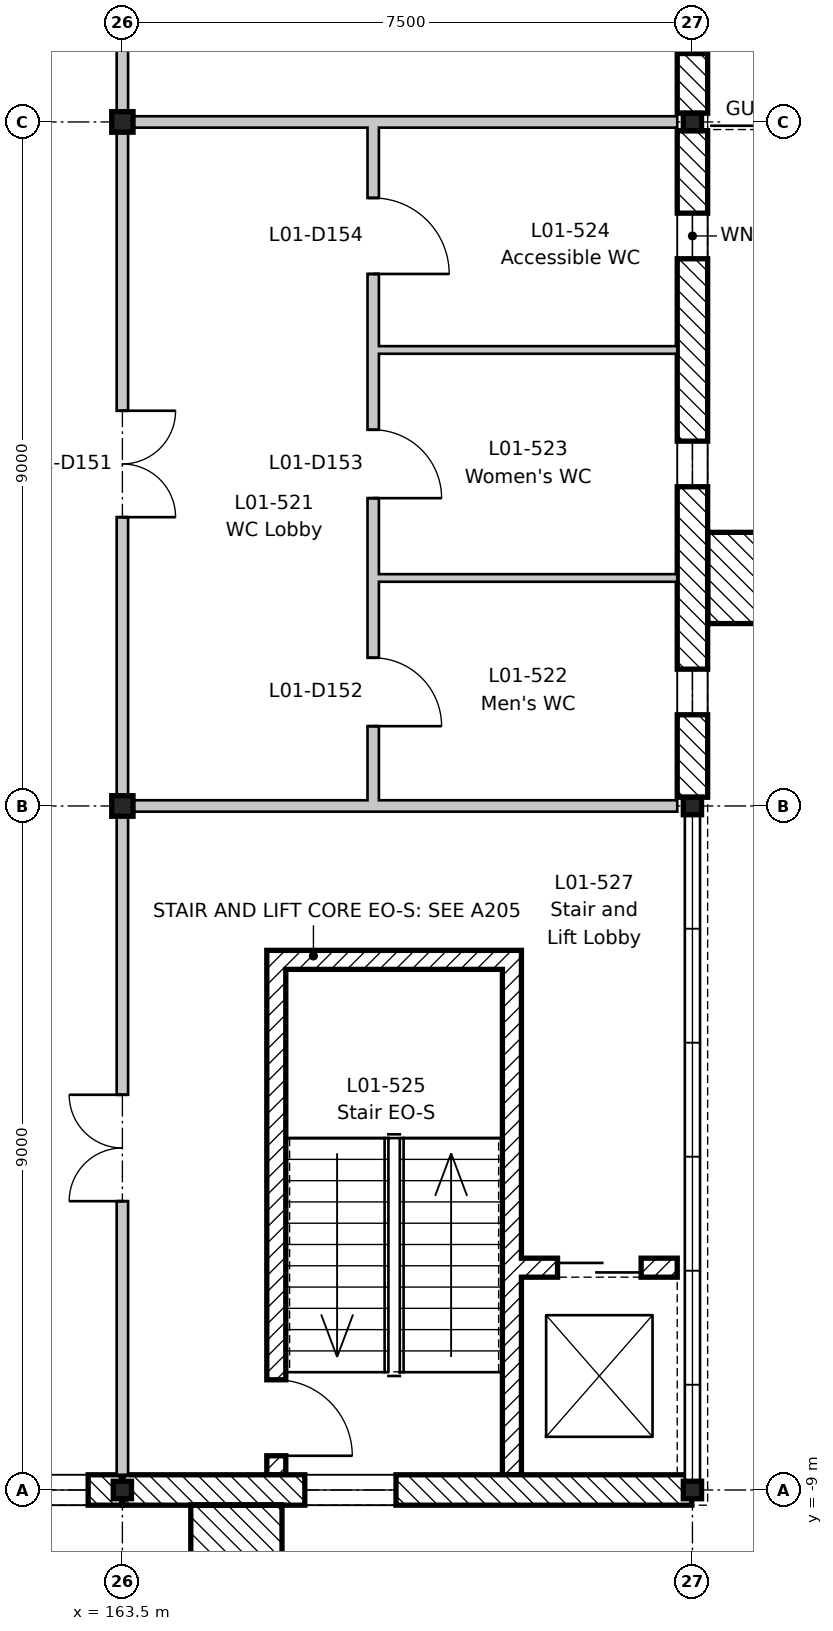
"""IFC4 building model, lengths in metres.
Left out: names, types, materials, properties, quantities, classifications, styles, units other than length and angle.
Written with IfcOpenShell. Run it as: python <this file> out.ifc"""

import sys

from ifc_helpers import new_model, si_unit, direction, frame, frame_2d, origin, origin_2d, place, context, subcontext, project, spatial, rectangle, i_section, extrude, element, fill, save


model = new_model("IFC4")
c1 = context("Model", 3, precision=1e-05, world=origin(), true_north=direction((0.0, 1.0)))
c2 = subcontext(c1, "Body", "Model", "MODEL_VIEW")
j1 = project(units=[si_unit("LENGTHUNIT", "METRE"), si_unit("PLANEANGLEUNIT", "RADIAN")], contexts=[c1])
p1 = place(None, origin())
s1 = spatial("IfcSite", under=j1, at=p1, CompositionType="ELEMENT")
p2 = place(p1, origin())
s2 = spatial("IfcBuilding", under=s1, at=p2, CompositionType="ELEMENT")
p3 = place(p2, frame((0.0, 0.0, 5.4)))
s3 = spatial("IfcBuildingStorey", under=s2, at=p3, CompositionType="ELEMENT", Elevation=5.4)
p4 = place(p3, frame((163.5, -9.0, -0.2), z_axis=(0.0, 0.0, 1.0), x_axis=(1.0, 0.0, 0.0)))
e1 = element("IfcColumn", 1, at=p4, inside=s3, PredefinedType="COLUMN", context=c2, shape_type="SweptSolid", body=[
    extrude(i_section(OverallWidth=0.24, OverallDepth=0.23, WebThickness=0.008, FlangeThickness=0.012, FilletRadius=0.021, at=origin_2d()), origin(), (0.0, 0.0, 1.0), 4.5),
])
for number, where, z_axis, x_axis in (
    (2, (163.5, 0.0, -0.2), (0.0, 0.0, 1.0), (1.0, 0.0, 0.0)),
    (3, (163.5, 9.0, -0.2), (0.0, 0.0, 1.0), (1.0, 0.0, 0.0)),
):
    element("IfcColumn", number, at=place(p3, frame(where, z_axis=z_axis, x_axis=x_axis)), inside=s3, PredefinedType="COLUMN", context=c2, shape_type="SweptSolid", body=[
        extrude(i_section(OverallWidth=0.28, OverallDepth=0.27, WebThickness=0.008, FlangeThickness=0.013, FilletRadius=0.024, at=origin_2d()), origin(), (0.0, 0.0, 1.0), 4.5),
    ])
for number, where, z_axis, x_axis in (
    (4, (171.0, -9.0, -0.2), (0.0, 0.0, 1.0), (1.0, 0.0, 0.0)),
    (5, (171.0, 0.0, -0.2), (0.0, 0.0, 1.0), (1.0, 0.0, 0.0)),
    (6, (171.0, 9.0, -0.2), (0.0, 0.0, 1.0), (1.0, 0.0, 0.0)),
):
    element("IfcColumn", number, at=place(p3, frame(where, z_axis=z_axis, x_axis=x_axis)), inside=s3, PredefinedType="COLUMN", context=c2, shape_type="SweptSolid", body=[
        extrude(i_section(OverallWidth=0.24, OverallDepth=0.23, WebThickness=0.008, FlangeThickness=0.012, FilletRadius=0.021, at=origin_2d()), origin(), (0.0, 0.0, 1.0), 4.5),
    ])
p5 = place(p3, frame((168.625, -8.8, 0.0), z_axis=(0.0, 0.0, 1.0), x_axis=(0.0, 1.0, 0.0)))
e7 = element("IfcWall", 7, at=p5, inside=s3, PredefinedType="SHEAR", context=c2, shape_type="SweptSolid", body=[
    extrude(rectangle(XDim=6.9, YDim=0.25, at=frame_2d((3.45, 0.0))), origin(), (0.0, 0.0, 1.0), 4.3),
])
p6 = place(p3, frame((165.525, -8.8, 0.0), z_axis=(0.0, 0.0, 1.0), x_axis=(0.0, 1.0, 0.0)))
e8 = element("IfcWall", 8, at=p6, inside=s3, PredefinedType="SHEAR", context=c2, shape_type="SweptSolid", body=[
    extrude(rectangle(XDim=6.9, YDim=0.25, at=frame_2d((3.45, 0.0))), origin(), (0.0, 0.0, 1.0), 4.3),
])
p7 = place(p6, frame((0.25, 0.0, 0.0)))
e9 = element("IfcOpeningElement", 9, at=p7, cuts=e8, PredefinedType="OPENING", context=c2, shape_type="SweptSolid", body=[
    extrude(rectangle(XDim=1.0, YDim=2.1, at=frame_2d((0.5, 1.05))), frame((0.0, 0.135, 0.0), z_axis=(0.0, -1.0, 0.0), x_axis=(1.0, 0.0, 0.0)), (0.0, 0.0, 1.0), 0.27),
])
p8 = place(p3, frame((165.65, -2.025, 0.0), z_axis=(0.0, 0.0, 1.0), x_axis=(1.0, 0.0, 0.0)))
e10 = element("IfcWall", 10, at=p8, inside=s3, PredefinedType="SHEAR", context=c2, shape_type="SweptSolid", body=[
    extrude(rectangle(XDim=2.85, YDim=0.25, at=frame_2d((1.425, 0.0))), origin(), (0.0, 0.0, 1.0), 4.3),
])
p9 = place(p3, frame((168.75, -6.075, 0.0), z_axis=(0.0, 0.0, 1.0), x_axis=(1.0, 0.0, 0.0)))
e11 = element("IfcWall", 11, at=p9, inside=s3, PredefinedType="SHEAR", context=c2, shape_type="SweptSolid", body=[
    extrude(rectangle(XDim=2.05, YDim=0.25, at=frame_2d((1.025, 0.0))), origin(), (0.0, 0.0, 1.0), 4.3),
])
p10 = place(p9, frame((0.475, 0.0, 0.0)))
e12 = element("IfcOpeningElement", 12, at=p10, cuts=e11, PredefinedType="OPENING", context=c2, shape_type="SweptSolid", body=[
    extrude(rectangle(XDim=1.1, YDim=2.1, at=frame_2d((0.55, 1.05))), frame((0.0, 0.135, 0.0), z_axis=(0.0, -1.0, 0.0), x_axis=(1.0, 0.0, 0.0)), (0.0, 0.0, 1.0), 0.27),
])
p11 = place(p3, frame((171.0, 8.885, 0.0), z_axis=(0.0, 0.0, 1.0), x_axis=(0.0, -1.0, 0.0)))
e13 = element("IfcWall", 13, at=p11, inside=s3, PredefinedType="STANDARD", context=c2, shape_type="SweptSolid", body=[
    extrude(rectangle(XDim=8.77, YDim=0.4, at=frame_2d((4.385, 0.0))), origin(), (0.0, 0.0, 1.0), 3.9),
])
p12 = place(p11, frame((7.085, 0.0, 1.5)))
e14 = element("IfcOpeningElement", 14, at=p12, cuts=e13, PredefinedType="OPENING", context=c2, shape_type="SweptSolid", body=[
    extrude(rectangle(XDim=0.6, YDim=1.2, at=frame_2d((0.3, 0.6))), frame((0.0, 0.21, 0.0), z_axis=(0.0, -1.0, 0.0), x_axis=(1.0, 0.0, 0.0)), (0.0, 0.0, 1.0), 0.42),
])
p13 = place(p11, frame((4.085, 0.0, 1.5)))
e15 = element("IfcOpeningElement", 15, at=p13, cuts=e13, PredefinedType="OPENING", context=c2, shape_type="SweptSolid", body=[
    extrude(rectangle(XDim=0.6, YDim=1.2, at=frame_2d((0.3, 0.6))), frame((0.0, 0.21, 0.0), z_axis=(0.0, -1.0, 0.0), x_axis=(1.0, 0.0, 0.0)), (0.0, 0.0, 1.0), 0.42),
])
p14 = place(p11, frame((1.085, 0.0, 1.5)))
e16 = element("IfcOpeningElement", 16, at=p14, cuts=e13, PredefinedType="OPENING", context=c2, shape_type="SweptSolid", body=[
    extrude(rectangle(XDim=0.6, YDim=1.2, at=frame_2d((0.3, 0.6))), frame((0.0, 0.21, 0.0), z_axis=(0.0, -1.0, 0.0), x_axis=(1.0, 0.0, 0.0)), (0.0, 0.0, 1.0), 0.42),
])
p15 = place(p3, frame((171.0, 17.885, 0.0), z_axis=(0.0, 0.0, 1.0), x_axis=(0.0, -1.0, 0.0)))
e17 = element("IfcWall", 17, at=p15, inside=s3, PredefinedType="STANDARD", context=c2, shape_type="SweptSolid", body=[
    extrude(rectangle(XDim=8.77, YDim=0.4, at=frame_2d((4.385, 0.0))), origin(), (0.0, 0.0, 1.0), 3.9),
])
p16 = place(p15, frame((6.785, 0.0, 0.9)))
e18 = element("IfcOpeningElement", 18, at=p16, cuts=e17, PredefinedType="OPENING", context=c2, shape_type="SweptSolid", body=[
    extrude(rectangle(XDim=1.2, YDim=2.4, at=frame_2d((0.6, 1.2))), frame((0.0, 0.21, 0.0), z_axis=(0.0, -1.0, 0.0), x_axis=(1.0, 0.0, 0.0)), (0.0, 0.0, 1.0), 0.42),
])
p17 = place(p15, frame((3.785, 0.0, 0.9)))
e19 = element("IfcOpeningElement", 19, at=p17, cuts=e17, PredefinedType="OPENING", context=c2, shape_type="SweptSolid", body=[
    extrude(rectangle(XDim=1.2, YDim=2.4, at=frame_2d((0.6, 1.2))), frame((0.0, 0.21, 0.0), z_axis=(0.0, -1.0, 0.0), x_axis=(1.0, 0.0, 0.0)), (0.0, 0.0, 1.0), 0.42),
])
p18 = place(p15, frame((0.785, 0.0, 0.9)))
e20 = element("IfcOpeningElement", 20, at=p18, cuts=e17, PredefinedType="OPENING", context=c2, shape_type="SweptSolid", body=[
    extrude(rectangle(XDim=1.2, YDim=2.4, at=frame_2d((0.6, 1.2))), frame((0.0, 0.21, 0.0), z_axis=(0.0, -1.0, 0.0), x_axis=(1.0, 0.0, 0.0)), (0.0, 0.0, 1.0), 0.42),
])
p19 = place(p3, frame((163.491, -9.0, 0.0), z_axis=(0.0, 0.0, 1.0), x_axis=(-1.0, 0.0, 0.0)))
e21 = element("IfcWall", 21, at=p19, inside=s3, PredefinedType="STANDARD", context=c2, shape_type="SweptSolid", body=[
    extrude(rectangle(XDim=2.982, YDim=0.4, at=frame_2d((1.491, 0.0))), origin(), (0.0, 0.0, 1.0), 4.1),
])
p20 = place(p19, frame((0.441, 0.0, 0.9)))
e22 = element("IfcOpeningElement", 22, at=p20, cuts=e21, PredefinedType="OPENING", context=c2, shape_type="SweptSolid", body=[
    extrude(rectangle(XDim=2.1, YDim=2.1, at=frame_2d((1.05, 1.05))), frame((0.0, 0.21, 0.0), z_axis=(0.0, -1.0, 0.0), x_axis=(1.0, 0.0, 0.0)), (0.0, 0.0, 1.0), 0.42),
])
p21 = place(p3, frame((170.991, -9.0, 0.0), z_axis=(0.0, 0.0, 1.0), x_axis=(-1.0, 0.0, 0.0)))
e23 = element("IfcWall", 23, at=p21, inside=s3, PredefinedType="STANDARD", context=c2, shape_type="SweptSolid", body=[
    extrude(rectangle(XDim=7.482, YDim=0.4, at=frame_2d((3.741, 0.0))), origin(), (0.0, 0.0, 1.0), 3.97),
])
p22 = place(p21, frame((3.891, 0.0, 0.9)))
e24 = element("IfcOpeningElement", 24, at=p22, cuts=e23, PredefinedType="OPENING", context=c2, shape_type="SweptSolid", body=[
    extrude(rectangle(XDim=1.2, YDim=2.7, at=frame_2d((0.6, 1.35))), frame((0.0, 0.21, 0.0), z_axis=(0.0, -1.0, 0.0), x_axis=(1.0, 0.0, 0.0)), (0.0, 0.0, 1.0), 0.42),
])
for number, where, z_axis, x_axis in (
    (25, (171.8, 2.4, 0.0), (0.0, 0.0, 1.0), (0.0, 1.0, 0.0)),
    (26, (164.4, -9.8, 0.0), (0.0, 0.0, 1.0), (1.0, 0.0, 0.0)),
):
    element("IfcWall", number, at=place(p3, frame(where, z_axis=z_axis, x_axis=x_axis)), inside=s3, PredefinedType="STANDARD", context=c2, shape_type="SweptSolid", body=[
        extrude(rectangle(XDim=1.2, YDim=1.2, at=frame_2d((0.6, 0.0))), origin(), (0.0, 0.0, 1.0), 4.5),
    ])
for number, where, z_axis, x_axis in (
    (27, (163.575, 9.0, 0.0), (0.0, 0.0, 1.0), (1.0, 0.0, 0.0)),
    (28, (163.575, 0.0, 0.0), (0.0, 0.0, 1.0), (1.0, 0.0, 0.0)),
):
    element("IfcWall", number, at=place(p3, frame(where, z_axis=z_axis, x_axis=x_axis)), inside=s3, PredefinedType="PARTITIONING", context=c2, shape_type="SweptSolid", body=[
        extrude(rectangle(XDim=7.225, YDim=0.15, at=frame_2d((3.613, 0.0))), origin(), (0.0, 0.0, 1.0), 3.95),
    ])
p23 = place(p3, frame((163.5, -8.8, 0.0), z_axis=(0.0, 0.0, 1.0), x_axis=(0.0, 1.0, 0.0)))
e29 = element("IfcWall", 29, at=p23, inside=s3, PredefinedType="PARTITIONING", context=c2, shape_type="SweptSolid", body=[
    extrude(rectangle(XDim=62.6, YDim=0.15, at=frame_2d((31.3, 0.0))), origin(), (0.0, 0.0, 1.0), 3.78),
])
p24 = place(p23, frame((18.8, 0.0, 0.0)))
e30 = element("IfcOpeningElement", 30, at=p24, cuts=e29, PredefinedType="OPENING", context=c2, shape_type="SweptSolid", body=[
    extrude(rectangle(XDim=1.0, YDim=2.1, at=frame_2d((0.5, 1.05))), frame((0.0, 0.085, 0.0), z_axis=(0.0, -1.0, 0.0), x_axis=(1.0, 0.0, 0.0)), (0.0, 0.0, 1.0), 0.17),
])
p25 = place(p23, frame((23.3, 0.0, 0.0)))
e31 = element("IfcOpeningElement", 31, at=p25, cuts=e29, PredefinedType="OPENING", context=c2, shape_type="SweptSolid", body=[
    extrude(rectangle(XDim=1.0, YDim=2.1, at=frame_2d((0.5, 1.05))), frame((0.0, 0.085, 0.0), z_axis=(0.0, -1.0, 0.0), x_axis=(1.0, 0.0, 0.0)), (0.0, 0.0, 1.0), 0.17),
])
p26 = place(p23, frame((29.3, 0.0, 0.0)))
e32 = element("IfcOpeningElement", 32, at=p26, cuts=e29, PredefinedType="OPENING", context=c2, shape_type="SweptSolid", body=[
    extrude(rectangle(XDim=1.0, YDim=2.1, at=frame_2d((0.5, 1.05))), frame((0.0, 0.085, 0.0), z_axis=(0.0, -1.0, 0.0), x_axis=(1.0, 0.0, 0.0)), (0.0, 0.0, 1.0), 0.17),
])
p27 = place(p23, frame((33.8, 0.0, 0.0)))
e33 = element("IfcOpeningElement", 33, at=p27, cuts=e29, PredefinedType="OPENING", context=c2, shape_type="SweptSolid", body=[
    extrude(rectangle(XDim=1.0, YDim=2.1, at=frame_2d((0.5, 1.05))), frame((0.0, 0.085, 0.0), z_axis=(0.0, -1.0, 0.0), x_axis=(1.0, 0.0, 0.0)), (0.0, 0.0, 1.0), 0.17),
])
p28 = place(p23, frame((45.8, 0.0, 0.0)))
e34 = element("IfcOpeningElement", 34, at=p28, cuts=e29, PredefinedType="OPENING", context=c2, shape_type="SweptSolid", body=[
    extrude(rectangle(XDim=1.0, YDim=2.1, at=frame_2d((0.5, 1.05))), frame((0.0, 0.085, 0.0), z_axis=(0.0, -1.0, 0.0), x_axis=(1.0, 0.0, 0.0)), (0.0, 0.0, 1.0), 0.17),
])
p29 = place(p23, frame((48.8, 0.0, 0.0)))
e35 = element("IfcOpeningElement", 35, at=p29, cuts=e29, PredefinedType="OPENING", context=c2, shape_type="SweptSolid", body=[
    extrude(rectangle(XDim=1.0, YDim=2.1, at=frame_2d((0.5, 1.05))), frame((0.0, 0.085, 0.0), z_axis=(0.0, -1.0, 0.0), x_axis=(1.0, 0.0, 0.0)), (0.0, 0.0, 1.0), 0.17),
])
p30 = place(p23, frame((51.8, 0.0, 0.0)))
e36 = element("IfcOpeningElement", 36, at=p30, cuts=e29, PredefinedType="OPENING", context=c2, shape_type="SweptSolid", body=[
    extrude(rectangle(XDim=1.0, YDim=2.1, at=frame_2d((0.5, 1.05))), frame((0.0, 0.085, 0.0), z_axis=(0.0, -1.0, 0.0), x_axis=(1.0, 0.0, 0.0)), (0.0, 0.0, 1.0), 0.17),
])
p31 = place(p23, frame((12.6, 0.0, 0.0)))
e37 = element("IfcOpeningElement", 37, at=p31, cuts=e29, PredefinedType="OPENING", context=c2, shape_type="SweptSolid", body=[
    extrude(rectangle(XDim=1.4, YDim=2.1, at=frame_2d((0.7, 1.05))), frame((0.0, 0.085, 0.0), z_axis=(0.0, -1.0, 0.0), x_axis=(1.0, 0.0, 0.0)), (0.0, 0.0, 1.0), 0.17),
])
p32 = place(p23, frame((3.6, 0.0, 0.0)))
e38 = element("IfcOpeningElement", 38, at=p32, cuts=e29, PredefinedType="OPENING", context=c2, shape_type="SweptSolid", body=[
    extrude(rectangle(XDim=1.4, YDim=2.1, at=frame_2d((0.7, 1.05))), frame((0.0, 0.085, 0.0), z_axis=(0.0, -1.0, 0.0), x_axis=(1.0, 0.0, 0.0)), (0.0, 0.0, 1.0), 0.17),
])
p33 = place(p23, frame((57.6, 0.0, 0.0)))
e39 = element("IfcOpeningElement", 39, at=p33, cuts=e29, PredefinedType="OPENING", context=c2, shape_type="SweptSolid", body=[
    extrude(rectangle(XDim=1.4, YDim=2.1, at=frame_2d((0.7, 1.05))), frame((0.0, 0.085, 0.0), z_axis=(0.0, -1.0, 0.0), x_axis=(1.0, 0.0, 0.0)), (0.0, 0.0, 1.0), 0.17),
])
p34 = place(p23, frame((36.75, 0.0, 0.0)))
e40 = element("IfcOpeningElement", 40, at=p34, cuts=e29, PredefinedType="OPENING", context=c2, shape_type="SweptSolid", body=[
    extrude(rectangle(XDim=1.0, YDim=2.1, at=frame_2d((0.5, 1.05))), frame((0.0, 0.085, 0.0), z_axis=(0.0, -1.0, 0.0), x_axis=(1.0, 0.0, 0.0)), (0.0, 0.0, 1.0), 0.17),
])
p35 = place(p23, frame((42.65, 0.0, 0.0)))
e41 = element("IfcOpeningElement", 41, at=p35, cuts=e29, PredefinedType="OPENING", context=c2, shape_type="SweptSolid", body=[
    extrude(rectangle(XDim=1.4, YDim=2.1, at=frame_2d((0.7, 1.05))), frame((0.0, 0.085, 0.0), z_axis=(0.0, -1.0, 0.0), x_axis=(1.0, 0.0, 0.0)), (0.0, 0.0, 1.0), 0.17),
])
p36 = place(p3, frame((166.8, 0.075, 0.0), z_axis=(0.0, 0.0, 1.0), x_axis=(0.0, 1.0, 0.0)))
e42 = element("IfcWall", 42, at=p36, inside=s3, PredefinedType="PARTITIONING", context=c2, shape_type="SweptSolid", body=[
    extrude(rectangle(XDim=8.85, YDim=0.15, at=frame_2d((4.425, 0.0))), origin(), (0.0, 0.0, 1.0), 4.3),
])
p37 = place(p36, frame((0.975, 0.0, 0.0)))
e43 = element("IfcOpeningElement", 43, at=p37, cuts=e42, PredefinedType="OPENING", context=c2, shape_type="SweptSolid", body=[
    extrude(rectangle(XDim=0.9, YDim=2.1, at=frame_2d((0.45, 1.05))), frame((0.0, 0.085, 0.0), z_axis=(0.0, -1.0, 0.0), x_axis=(1.0, 0.0, 0.0)), (0.0, 0.0, 1.0), 0.17),
])
p38 = place(p36, frame((3.975, 0.0, 0.0)))
e44 = element("IfcOpeningElement", 44, at=p38, cuts=e42, PredefinedType="OPENING", context=c2, shape_type="SweptSolid", body=[
    extrude(rectangle(XDim=0.9, YDim=2.1, at=frame_2d((0.45, 1.05))), frame((0.0, 0.085, 0.0), z_axis=(0.0, -1.0, 0.0), x_axis=(1.0, 0.0, 0.0)), (0.0, 0.0, 1.0), 0.17),
])
p39 = place(p36, frame((6.925, 0.0, 0.0)))
e45 = element("IfcOpeningElement", 45, at=p39, cuts=e42, PredefinedType="OPENING", context=c2, shape_type="SweptSolid", body=[
    extrude(rectangle(XDim=1.0, YDim=2.1, at=frame_2d((0.5, 1.05))), frame((0.0, 0.085, 0.0), z_axis=(0.0, -1.0, 0.0), x_axis=(1.0, 0.0, 0.0)), (0.0, 0.0, 1.0), 0.17),
])
for number, where, z_axis, x_axis in (
    (46, (166.875, 3.0, 0.0), (0.0, 0.0, 1.0), (1.0, 0.0, 0.0)),
    (47, (166.875, 6.0, 0.0), (0.0, 0.0, 1.0), (1.0, 0.0, 0.0)),
):
    element("IfcWall", number, at=place(p3, frame(where, z_axis=z_axis, x_axis=x_axis)), inside=s3, PredefinedType="PARTITIONING", context=c2, shape_type="SweptSolid", body=[
        extrude(rectangle(XDim=3.925, YDim=0.1, at=frame_2d((1.962, 0.0))), origin(), (0.0, 0.0, 1.0), 4.3),
    ])
p40 = place(p12, origin())
e48 = element("IfcWindow", 48, at=p40, inside=s3, PartitioningType="SINGLE_PANEL", PredefinedType="WINDOW", context=c2, shape_type="SweptSolid", body=[
    extrude(rectangle(XDim=0.6, YDim=1.2, at=frame_2d((0.3, 0.6))), frame((0.0, -0.12, 0.0), z_axis=(0.0, -1.0, 0.0), x_axis=(1.0, 0.0, 0.0)), (0.0, 0.0, 1.0), 0.06),
])
fill(e14, e48)
p41 = place(p13, origin())
e49 = element("IfcWindow", 49, at=p41, inside=s3, PartitioningType="SINGLE_PANEL", PredefinedType="WINDOW", context=c2, shape_type="SweptSolid", body=[
    extrude(rectangle(XDim=0.6, YDim=1.2, at=frame_2d((0.3, 0.6))), frame((0.0, -0.12, 0.0), z_axis=(0.0, -1.0, 0.0), x_axis=(1.0, 0.0, 0.0)), (0.0, 0.0, 1.0), 0.06),
])
fill(e15, e49)
p42 = place(p14, origin())
e50 = element("IfcWindow", 50, at=p42, inside=s3, PartitioningType="SINGLE_PANEL", PredefinedType="WINDOW", context=c2, shape_type="SweptSolid", body=[
    extrude(rectangle(XDim=0.6, YDim=1.2, at=frame_2d((0.3, 0.6))), frame((0.0, -0.12, 0.0), z_axis=(0.0, -1.0, 0.0), x_axis=(1.0, 0.0, 0.0)), (0.0, 0.0, 1.0), 0.06),
])
fill(e16, e50)
p43 = place(p16, origin())
e51 = element("IfcWindow", 51, at=p43, inside=s3, PartitioningType="SINGLE_PANEL", PredefinedType="WINDOW", context=c2, shape_type="SweptSolid", body=[
    extrude(rectangle(XDim=1.2, YDim=2.4, at=frame_2d((0.6, 1.2))), frame((0.0, -0.12, 0.0), z_axis=(0.0, -1.0, 0.0), x_axis=(1.0, 0.0, 0.0)), (0.0, 0.0, 1.0), 0.06),
])
fill(e18, e51)
p44 = place(p20, origin())
e52 = element("IfcWindow", 52, at=p44, inside=s3, PartitioningType="SINGLE_PANEL", PredefinedType="WINDOW", context=c2, shape_type="SweptSolid", body=[
    extrude(rectangle(XDim=2.1, YDim=2.1, at=frame_2d((1.05, 1.05))), frame((0.0, -0.12, 0.0), z_axis=(0.0, -1.0, 0.0), x_axis=(1.0, 0.0, 0.0)), (0.0, 0.0, 1.0), 0.06),
])
fill(e22, e52)
p45 = place(p22, origin())
e53 = element("IfcWindow", 53, at=p45, inside=s3, PartitioningType="SINGLE_PANEL", PredefinedType="WINDOW", context=c2, shape_type="SweptSolid", body=[
    extrude(rectangle(XDim=1.2, YDim=2.7, at=frame_2d((0.6, 1.35))), frame((0.0, -0.12, 0.0), z_axis=(0.0, -1.0, 0.0), x_axis=(1.0, 0.0, 0.0)), (0.0, 0.0, 1.0), 0.06),
])
fill(e24, e53)
p46 = place(p31, frame((1.4, 0.0, 0.0), z_axis=(0.0, 0.0, 1.0), x_axis=(-1.0, 0.0, 0.0)))
e54 = element("IfcDoor", 54, at=p46, inside=s3, OperationType="DOUBLE_DOOR_SINGLE_SWING", PredefinedType="DOOR", context=c2, shape_type="SweptSolid", body=[
    extrude(rectangle(XDim=1.4, YDim=2.1, at=frame_2d((0.7, 1.05))), frame((0.0, 0.025, 0.0), z_axis=(0.0, -1.0, 0.0), x_axis=(1.0, 0.0, 0.0)), (0.0, 0.0, 1.0), 0.05),
])
fill(e37, e54)
p47 = place(p37, frame((0.9, 0.0, 0.0), z_axis=(0.0, 0.0, 1.0), x_axis=(-1.0, 0.0, 0.0)))
e55 = element("IfcDoor", 55, at=p47, inside=s3, OperationType="SINGLE_SWING_RIGHT", PredefinedType="DOOR", context=c2, shape_type="SweptSolid", body=[
    extrude(rectangle(XDim=0.9, YDim=2.1, at=frame_2d((0.45, 1.05))), frame((0.0, 0.025, 0.0), z_axis=(0.0, -1.0, 0.0), x_axis=(1.0, 0.0, 0.0)), (0.0, 0.0, 1.0), 0.05),
])
fill(e43, e55)
p48 = place(p38, frame((0.9, 0.0, 0.0), z_axis=(0.0, 0.0, 1.0), x_axis=(-1.0, 0.0, 0.0)))
e56 = element("IfcDoor", 56, at=p48, inside=s3, OperationType="SINGLE_SWING_RIGHT", PredefinedType="DOOR", context=c2, shape_type="SweptSolid", body=[
    extrude(rectangle(XDim=0.9, YDim=2.1, at=frame_2d((0.45, 1.05))), frame((0.0, 0.025, 0.0), z_axis=(0.0, -1.0, 0.0), x_axis=(1.0, 0.0, 0.0)), (0.0, 0.0, 1.0), 0.05),
])
fill(e44, e56)
p49 = place(p39, frame((1.0, 0.0, 0.0), z_axis=(0.0, 0.0, 1.0), x_axis=(-1.0, 0.0, 0.0)))
e57 = element("IfcDoor", 57, at=p49, inside=s3, OperationType="SINGLE_SWING_RIGHT", PredefinedType="DOOR", context=c2, shape_type="SweptSolid", body=[
    extrude(rectangle(XDim=1.0, YDim=2.1, at=frame_2d((0.5, 1.05))), frame((0.0, 0.025, 0.0), z_axis=(0.0, -1.0, 0.0), x_axis=(1.0, 0.0, 0.0)), (0.0, 0.0, 1.0), 0.05),
])
fill(e45, e57)
p50 = place(p7, frame((1.0, 0.0, 0.0), z_axis=(0.0, 0.0, 1.0), x_axis=(-1.0, 0.0, 0.0)))
e58 = element("IfcDoor", 58, at=p50, inside=s3, OperationType="SINGLE_SWING_RIGHT", PredefinedType="DOOR", context=c2, shape_type="SweptSolid", body=[
    extrude(rectangle(XDim=1.0, YDim=2.1, at=frame_2d((0.5, 1.05))), frame((0.0, 0.025, 0.0), z_axis=(0.0, -1.0, 0.0), x_axis=(1.0, 0.0, 0.0)), (0.0, 0.0, 1.0), 0.05),
])
fill(e9, e58)
p51 = place(p32, origin())
e59 = element("IfcDoor", 59, at=p51, inside=s3, OperationType="DOUBLE_DOOR_SINGLE_SWING", PredefinedType="DOOR", context=c2, shape_type="SweptSolid", body=[
    extrude(rectangle(XDim=1.4, YDim=2.1, at=frame_2d((0.7, 1.05))), frame((0.0, 0.025, 0.0), z_axis=(0.0, -1.0, 0.0), x_axis=(1.0, 0.0, 0.0)), (0.0, 0.0, 1.0), 0.05),
])
fill(e38, e59)
p52 = place(p10, origin())
e60 = element("IfcDoor", 60, at=p52, inside=s3, OperationType="SLIDING_TO_LEFT", PredefinedType="DOOR", context=c2, shape_type="SweptSolid", body=[
    extrude(rectangle(XDim=1.1, YDim=2.1, at=frame_2d((0.55, 1.05))), frame((0.0, 0.025, 0.0), z_axis=(0.0, -1.0, 0.0), x_axis=(1.0, 0.0, 0.0)), (0.0, 0.0, 1.0), 0.05),
])
fill(e12, e60)
save(model, sys.argv[1])
